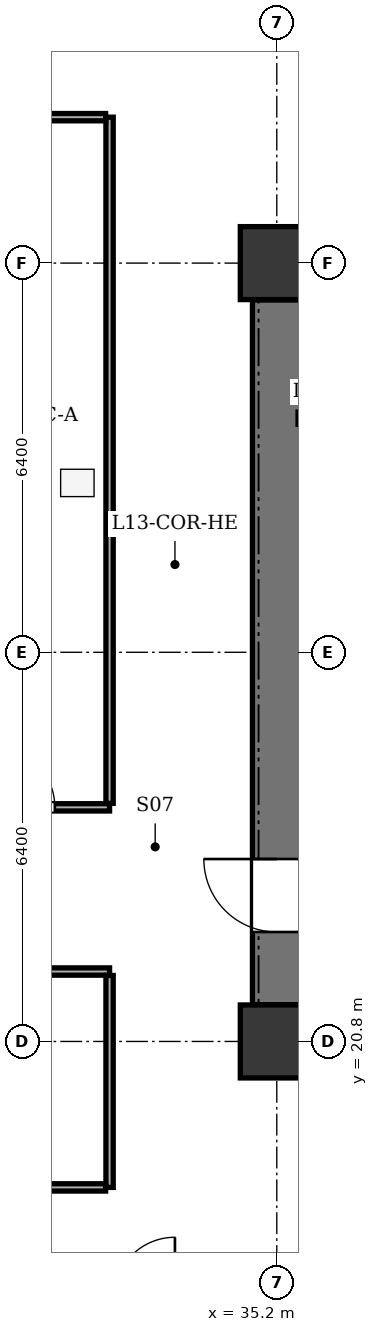
"""IFC4 building model, lengths in metres.
Left out: names, types, materials, properties, quantities, classifications, styles, units other than length and angle.
Written with IfcOpenShell. Run it as: python <this file> out.ifc"""

import sys

from ifc_helpers import new_model, si_unit, direction, frame, frame_2d, origin, origin_2d, place, context, subcontext, project, spatial, rectangle, extrude, element, fill, save


model = new_model("IFC4")
c1 = context("Model", 3, precision=1e-05, world=origin(), true_north=direction((0.0, 1.0)))
c2 = subcontext(c1, "Body", "Model", "MODEL_VIEW")
j1 = project(units=[si_unit("LENGTHUNIT", "METRE"), si_unit("PLANEANGLEUNIT", "RADIAN")], contexts=[c1])
p1 = place(None, origin())
s1 = spatial("IfcSite", under=j1, at=p1, CompositionType="ELEMENT")
p2 = place(p1, origin())
s2 = spatial("IfcBuilding", under=s1, at=p2, CompositionType="ELEMENT")
p3 = place(p2, frame((0.0, 0.0, 55.5)))
s3 = spatial("IfcBuildingStorey", under=s2, at=p3, CompositionType="ELEMENT", Elevation=55.5)
for number, where, z_axis, x_axis in (
    (1, (35.2, 20.8, 0.0), (0.0, 0.0, 1.0), (1.0, 0.0, 0.0)),
    (2, (35.2, 33.6, 0.0), (0.0, 0.0, 1.0), (1.0, 0.0, 0.0)),
):
    element("IfcColumn", number, at=place(p3, frame(where, z_axis=z_axis, x_axis=x_axis)), inside=s3, PredefinedType="COLUMN", context=c2, shape_type="SweptSolid", body=[
        extrude(rectangle(XDim=1.2, YDim=1.2, at=origin_2d()), origin(), (0.0, 0.0, 1.0), 3.9),
    ])
p4 = place(p3, frame((35.2, 21.405, 0.0), z_axis=(0.0, 0.0, 1.0), x_axis=(0.0, 1.0, 0.0)))
e3 = element("IfcWall", 3, at=p4, inside=s3, PredefinedType="SHEAR", context=c2, shape_type="SweptSolid", body=[
    extrude(rectangle(XDim=11.59, YDim=0.8, at=frame_2d((5.795, 0.0))), origin(), (0.0, 0.0, 1.0), 3.6),
])
p5 = place(p4, frame((1.195, 0.0, 0.0)))
e4 = element("IfcOpeningElement", 4, at=p5, cuts=e3, PredefinedType="OPENING", context=c2, shape_type="SweptSolid", body=[
    extrude(rectangle(XDim=1.2, YDim=2.15, at=frame_2d((0.6, 1.075))), frame((0.0, 0.41, 0.0), z_axis=(0.0, -1.0, 0.0), x_axis=(1.0, 0.0, 0.0)), (0.0, 0.0, 1.0), 0.82),
])
p6 = place(p3, frame((23.55, 24.65, 0.0), z_axis=(0.0, 0.0, 1.0), x_axis=(1.0, 0.0, 0.0)))
e5 = element("IfcWall", 5, at=p6, inside=s3, PredefinedType="PARTITIONING", context=c2, shape_type="SweptSolid", body=[
    extrude(rectangle(XDim=8.9, YDim=0.12, at=frame_2d((4.45, 0.0))), origin(), (0.0, 0.0, 1.0), 3.135),
])
p7 = place(p6, frame((1.0, 0.0, 0.0)))
e6 = element("IfcOpeningElement", 6, at=p7, cuts=e5, PredefinedType="OPENING", context=c2, shape_type="SweptSolid", body=[
    extrude(rectangle(XDim=0.95, YDim=2.1, at=frame_2d((0.475, 1.05))), frame((0.0, 0.07, 0.0), z_axis=(0.0, -1.0, 0.0), x_axis=(1.0, 0.0, 0.0)), (0.0, 0.0, 1.0), 0.14),
])
p8 = place(p6, frame((4.1, 0.0, 0.0)))
e7 = element("IfcOpeningElement", 7, at=p8, cuts=e5, PredefinedType="OPENING", context=c2, shape_type="SweptSolid", body=[
    extrude(rectangle(XDim=0.95, YDim=2.1, at=frame_2d((0.475, 1.05))), frame((0.0, 0.07, 0.0), z_axis=(0.0, -1.0, 0.0), x_axis=(1.0, 0.0, 0.0)), (0.0, 0.0, 1.0), 0.14),
])
p9 = place(p6, frame((7.0, 0.0, 0.0)))
e8 = element("IfcOpeningElement", 8, at=p9, cuts=e5, PredefinedType="OPENING", context=c2, shape_type="SweptSolid", body=[
    extrude(rectangle(XDim=1.0, YDim=2.1, at=frame_2d((0.5, 1.05))), frame((0.0, 0.07, 0.0), z_axis=(0.0, -1.0, 0.0), x_axis=(1.0, 0.0, 0.0)), (0.0, 0.0, 1.0), 0.14),
])
p10 = place(p3, frame((32.45, 24.715, 0.0), z_axis=(0.0, 0.0, 1.0), x_axis=(0.0, 1.0, 0.0)))
e9 = element("IfcWall", 9, at=p10, inside=s3, PredefinedType="PARTITIONING", context=c2, shape_type="SweptSolid", body=[
    extrude(rectangle(XDim=11.285, YDim=0.12, at=frame_2d((5.643, 0.0))), origin(), (0.0, 0.0, 1.0), 3.6),
])
p11 = place(p3, frame((23.615, 36.0, 0.0), z_axis=(0.0, 0.0, 1.0), x_axis=(1.0, 0.0, 0.0)))
e10 = element("IfcWall", 10, at=p11, inside=s3, PredefinedType="PARTITIONING", context=c2, shape_type="SweptSolid", body=[
    extrude(rectangle(XDim=8.77, YDim=0.12, at=frame_2d((4.385, 0.0))), origin(), (0.0, 0.0, 1.0), 3.6),
])
p12 = place(p3, frame((23.55, 21.95, 0.0), z_axis=(0.0, 0.0, 1.0), x_axis=(1.0, 0.0, 0.0)))
e11 = element("IfcWall", 11, at=p12, inside=s3, PredefinedType="PARTITIONING", context=c2, shape_type="SweptSolid", body=[
    extrude(rectangle(XDim=8.9, YDim=0.12, at=frame_2d((4.45, 0.0))), origin(), (0.0, 0.0, 1.0), 3.135),
])
p13 = place(p12, frame((3.6, 0.0, 0.0)))
e12 = element("IfcOpeningElement", 12, at=p13, cuts=e11, PredefinedType="OPENING", context=c2, shape_type="SweptSolid", body=[
    extrude(rectangle(XDim=1.1, YDim=2.15, at=frame_2d((0.55, 1.075))), frame((0.0, 0.07, 0.0), z_axis=(0.0, -1.0, 0.0), x_axis=(1.0, 0.0, 0.0)), (0.0, 0.0, 1.0), 0.14),
])
p14 = place(p3, frame((32.45, 18.4, 0.0), z_axis=(0.0, 0.0, 1.0), x_axis=(0.0, 1.0, 0.0)))
e13 = element("IfcWall", 13, at=p14, inside=s3, PredefinedType="PARTITIONING", context=c2, shape_type="SweptSolid", body=[
    extrude(rectangle(XDim=3.485, YDim=0.12, at=frame_2d((1.743, 0.0))), origin(), (0.0, 0.0, 1.0), 3.6),
])
p15 = place(p3, frame((23.615, 18.4, 0.0), z_axis=(0.0, 0.0, 1.0), x_axis=(1.0, 0.0, 0.0)))
e14 = element("IfcWall", 14, at=p15, inside=s3, PredefinedType="PARTITIONING", context=c2, shape_type="SweptSolid", body=[
    extrude(rectangle(XDim=8.77, YDim=0.12, at=frame_2d((4.385, 0.0))), origin(), (0.0, 0.0, 1.0), 3.6),
])
p16 = place(p5, origin())
e15 = element("IfcDoor", 15, at=p16, inside=s3, OperationType="SINGLE_SWING_RIGHT", PredefinedType="DOOR", context=c2, shape_type="SweptSolid", body=[
    extrude(rectangle(XDim=1.2, YDim=2.15, at=frame_2d((0.6, 1.075))), frame((0.0, 0.025, 0.0), z_axis=(0.0, -1.0, 0.0), x_axis=(1.0, 0.0, 0.0)), (0.0, 0.0, 1.0), 0.05),
])
fill(e4, e15)
p17 = place(p9, origin())
e16 = element("IfcDoor", 16, at=p17, inside=s3, OperationType="SINGLE_SWING_LEFT", PredefinedType="DOOR", context=c2, shape_type="SweptSolid", body=[
    extrude(rectangle(XDim=1.0, YDim=2.1, at=frame_2d((0.5, 1.05))), frame((0.0, 0.025, 0.0), z_axis=(0.0, -1.0, 0.0), x_axis=(1.0, 0.0, 0.0)), (0.0, 0.0, 1.0), 0.05),
])
fill(e8, e16)
save(model, sys.argv[1])
